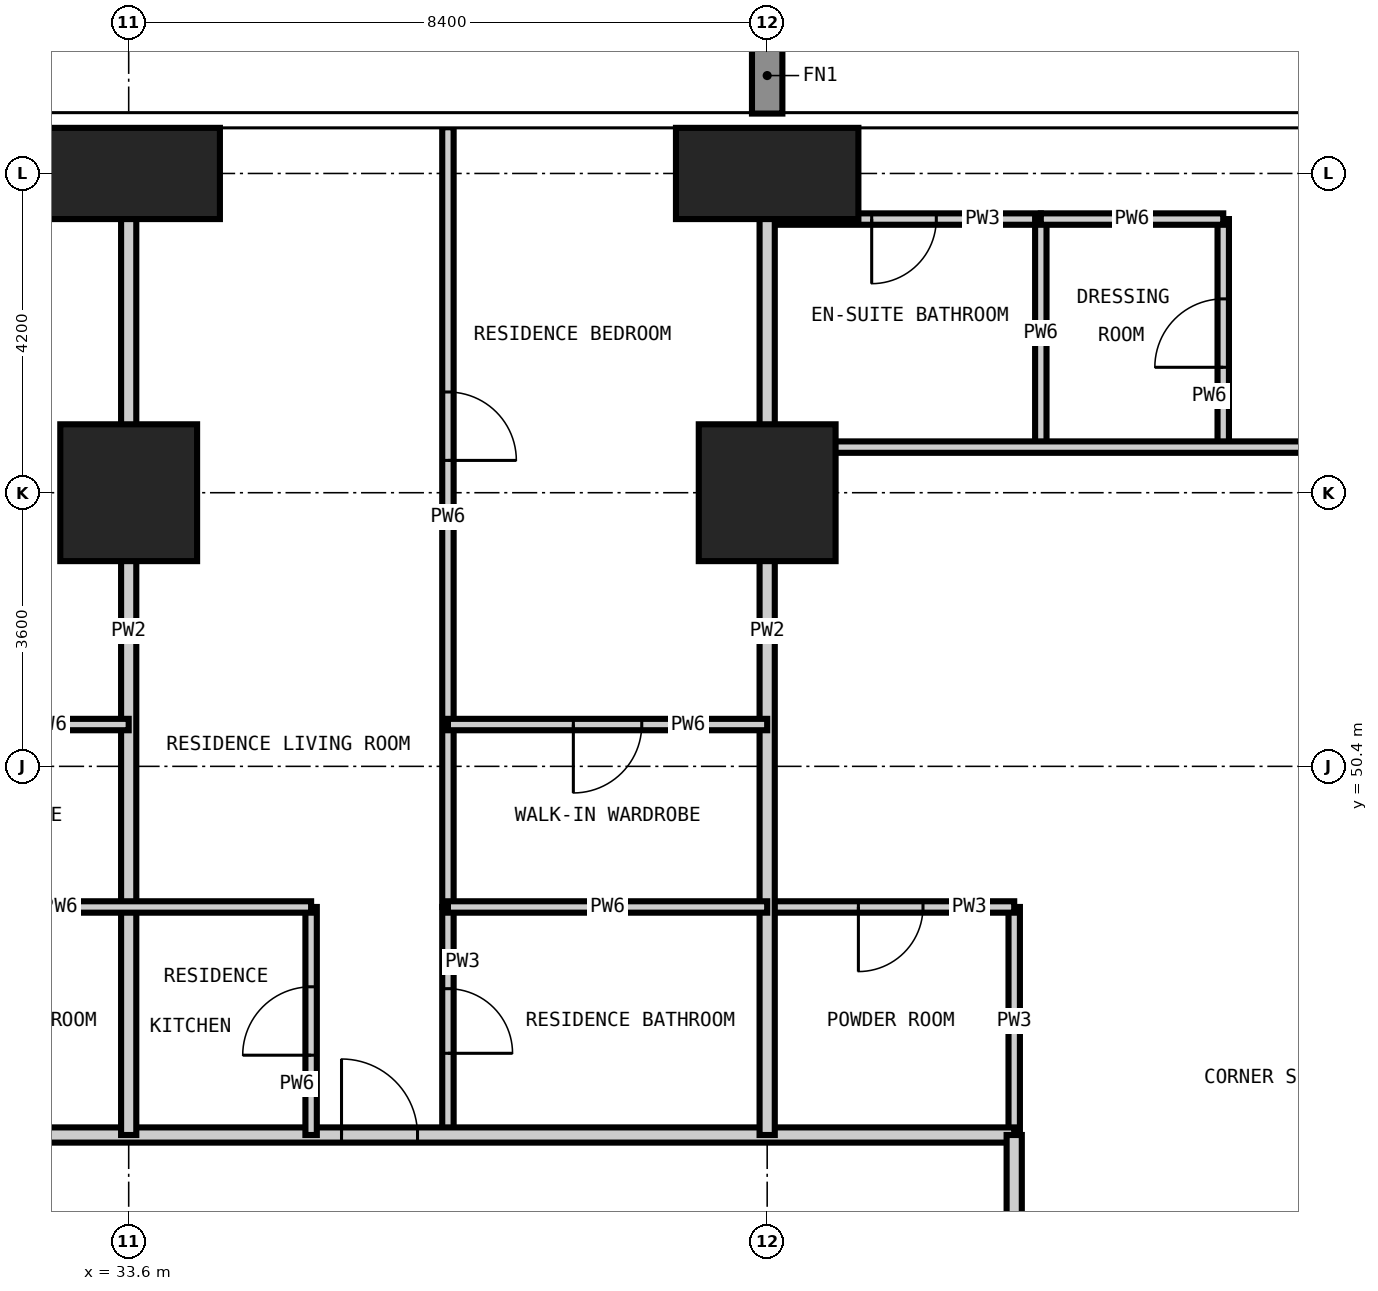
"""IFC4 building model, lengths in metres.
Left out: names, types, materials, properties, quantities, classifications, styles, units other than length and angle.
Written with IfcOpenShell. Run it as: python <this file> out.ifc"""

import sys

from ifc_helpers import new_model, si_unit, direction, frame, frame_2d, origin, origin_2d, place, context, subcontext, project, spatial, rectangle, extrude, element, fill, save


model = new_model("IFC4")
c1 = context("Model", 3, precision=1e-05, world=origin(), true_north=direction((0.0, 1.0)))
c2 = subcontext(c1, "Body", "Model", "MODEL_VIEW")
j1 = project(units=[si_unit("LENGTHUNIT", "METRE"), si_unit("PLANEANGLEUNIT", "RADIAN")], contexts=[c1])
p1 = place(None, origin())
s1 = spatial("IfcSite", under=j1, at=p1, CompositionType="ELEMENT")
p2 = place(p1, origin())
s2 = spatial("IfcBuilding", under=s1, at=p2, CompositionType="ELEMENT")
p3 = place(p2, frame((0.0, 0.0, 45.0)))
s3 = spatial("IfcBuildingStorey", under=s2, at=p3, CompositionType="ELEMENT", Elevation=45.0)
p4 = place(p3, frame((33.6, 54.0, -0.35), z_axis=(0.0, 0.0, 1.0), x_axis=(1.0, 0.0, 0.0)))
e1 = element("IfcColumn", 1, at=p4, inside=s3, PredefinedType="COLUMN", context=c2, shape_type="SweptSolid", body=[
    extrude(rectangle(XDim=1.8, YDim=1.8, at=origin_2d()), origin(), (0.0, 0.0, 1.0), 3.6),
])
p5 = place(p3, frame((33.6, 58.2, -0.35), z_axis=(0.0, 0.0, 1.0), x_axis=(1.0, 0.0, 0.0)))
e2 = element("IfcColumn", 2, at=p5, inside=s3, PredefinedType="COLUMN", context=c2, shape_type="SweptSolid", body=[
    extrude(rectangle(XDim=2.4, YDim=1.2, at=origin_2d()), origin(), (0.0, 0.0, 1.0), 3.6),
])
p6 = place(p3, frame((42.0, 54.0, -0.35), z_axis=(0.0, 0.0, 1.0), x_axis=(1.0, 0.0, 0.0)))
e3 = element("IfcColumn", 3, at=p6, inside=s3, PredefinedType="COLUMN", context=c2, shape_type="SweptSolid", body=[
    extrude(rectangle(XDim=1.8, YDim=1.8, at=origin_2d()), origin(), (0.0, 0.0, 1.0), 3.6),
])
p7 = place(p3, frame((42.0, 58.2, -0.35), z_axis=(0.0, 0.0, 1.0), x_axis=(1.0, 0.0, 0.0)))
e4 = element("IfcColumn", 4, at=p7, inside=s3, PredefinedType="COLUMN", context=c2, shape_type="SweptSolid", body=[
    extrude(rectangle(XDim=2.4, YDim=1.2, at=origin_2d()), origin(), (0.0, 0.0, 1.0), 3.6),
])
p8 = place(p3, frame((37.8, 45.55, 0.0), z_axis=(0.0, 0.0, 1.0), x_axis=(0.0, 1.0, 0.0)))
e5 = element("IfcWall", 5, at=p8, inside=s3, PredefinedType="PARTITIONING", context=c2, shape_type="SweptSolid", body=[
    extrude(rectangle(XDim=3.0, YDim=0.15, at=frame_2d((1.5, 0.0))), origin(), (0.0, 0.0, 1.0), 3.25),
])
p9 = place(p8, frame((1.075, 0.0, 0.0)))
e6 = element("IfcOpeningElement", 6, at=p9, cuts=e5, PredefinedType="OPENING", context=c2, shape_type="SweptSolid", body=[
    extrude(rectangle(XDim=0.85, YDim=2.1, at=frame_2d((0.425, 1.05))), frame((0.0, 0.085, 0.0), z_axis=(0.0, -1.0, 0.0), x_axis=(1.0, 0.0, 0.0)), (0.0, 0.0, 1.0), 0.17),
])
p10 = place(p3, frame((45.25, 45.55, 0.0), z_axis=(0.0, 0.0, 1.0), x_axis=(0.0, 1.0, 0.0)))
e7 = element("IfcWall", 7, at=p10, inside=s3, PredefinedType="PARTITIONING", context=c2, shape_type="SweptSolid", body=[
    extrude(rectangle(XDim=3.0, YDim=0.15, at=frame_2d((1.5, 0.0))), origin(), (0.0, 0.0, 1.0), 3.25),
])
p11 = place(p3, frame((42.0, 48.55, 0.0), z_axis=(0.0, 0.0, 1.0), x_axis=(1.0, 0.0, 0.0)))
e8 = element("IfcWall", 8, at=p11, inside=s3, PredefinedType="PARTITIONING", context=c2, shape_type="SweptSolid", body=[
    extrude(rectangle(XDim=3.25, YDim=0.15, at=frame_2d((1.625, 0.0))), origin(), (0.0, 0.0, 1.0), 3.25),
])
p12 = place(p11, frame((1.2, 0.0, 0.0)))
e9 = element("IfcOpeningElement", 9, at=p12, cuts=e8, PredefinedType="OPENING", context=c2, shape_type="SweptSolid", body=[
    extrude(rectangle(XDim=0.85, YDim=2.1, at=frame_2d((0.425, 1.05))), frame((0.0, 0.085, 0.0), z_axis=(0.0, -1.0, 0.0), x_axis=(1.0, 0.0, 0.0)), (0.0, 0.0, 1.0), 0.17),
])
p13 = place(p3, frame((42.0, 57.6, 0.0), z_axis=(0.0, 0.0, 1.0), x_axis=(1.0, 0.0, 0.0)))
e10 = element("IfcWall", 10, at=p13, inside=s3, PredefinedType="PARTITIONING", context=c2, shape_type="SweptSolid", body=[
    extrude(rectangle(XDim=3.6, YDim=0.15, at=frame_2d((1.8, 0.0))), origin(), (0.0, 0.0, 1.0), 3.25),
])
p14 = place(p13, frame((1.375, 0.0, 0.0)))
e11 = element("IfcOpeningElement", 11, at=p14, cuts=e10, PredefinedType="OPENING", context=c2, shape_type="SweptSolid", body=[
    extrude(rectangle(XDim=0.85, YDim=2.1, at=frame_2d((0.425, 1.05))), frame((0.0, 0.085, 0.0), z_axis=(0.0, -1.0, 0.0), x_axis=(1.0, 0.0, 0.0)), (0.0, 0.0, 1.0), 0.17),
])
p15 = place(p3, frame((12.95, 45.55, 0.0), z_axis=(0.0, 0.0, 1.0), x_axis=(1.0, 0.0, 0.0)))
e12 = element("IfcWall", 12, at=p15, inside=s3, PredefinedType="PARTITIONING", context=c2, shape_type="SweptSolid", body=[
    extrude(rectangle(XDim=32.3, YDim=0.2, at=frame_2d((16.15, 0.0))), origin(), (0.0, 0.0, 1.0), 3.25),
])
p16 = place(p15, frame((6.65, 0.0, 0.0)))
e13 = element("IfcOpeningElement", 13, at=p16, cuts=e12, PredefinedType="OPENING", context=c2, shape_type="SweptSolid", body=[
    extrude(rectangle(XDim=1.0, YDim=2.2, at=frame_2d((0.5, 1.1))), frame((0.0, 0.11, 0.0), z_axis=(0.0, -1.0, 0.0), x_axis=(1.0, 0.0, 0.0)), (0.0, 0.0, 1.0), 0.22),
])
p17 = place(p15, frame((15.05, 0.0, 0.0)))
e14 = element("IfcOpeningElement", 14, at=p17, cuts=e12, PredefinedType="OPENING", context=c2, shape_type="SweptSolid", body=[
    extrude(rectangle(XDim=1.0, YDim=2.2, at=frame_2d((0.5, 1.1))), frame((0.0, 0.11, 0.0), z_axis=(0.0, -1.0, 0.0), x_axis=(1.0, 0.0, 0.0)), (0.0, 0.0, 1.0), 0.22),
])
p18 = place(p15, frame((23.45, 0.0, 0.0)))
e15 = element("IfcOpeningElement", 15, at=p18, cuts=e12, PredefinedType="OPENING", context=c2, shape_type="SweptSolid", body=[
    extrude(rectangle(XDim=1.0, YDim=2.2, at=frame_2d((0.5, 1.1))), frame((0.0, 0.11, 0.0), z_axis=(0.0, -1.0, 0.0), x_axis=(1.0, 0.0, 0.0)), (0.0, 0.0, 1.0), 0.22),
])
p19 = place(p3, frame((45.25, 45.55, 0.0), z_axis=(0.0, 0.0, 1.0), x_axis=(0.0, -1.0, 0.0)))
e16 = element("IfcWall", 16, at=p19, inside=s3, PredefinedType="PARTITIONING", context=c2, shape_type="SweptSolid", body=[
    extrude(rectangle(XDim=32.6, YDim=0.2, at=frame_2d((16.3, 0.0))), origin(), (0.0, 0.0, 1.0), 3.25),
])
p20 = place(p19, frame((24.8, 0.0, 0.0)))
e17 = element("IfcOpeningElement", 17, at=p20, cuts=e16, PredefinedType="OPENING", context=c2, shape_type="SweptSolid", body=[
    extrude(rectangle(XDim=1.0, YDim=2.2, at=frame_2d((0.5, 1.1))), frame((0.0, 0.11, 0.0), z_axis=(0.0, -1.0, 0.0), x_axis=(1.0, 0.0, 0.0)), (0.0, 0.0, 1.0), 0.22),
])
p21 = place(p19, frame((19.85, 0.0, 0.0)))
e18 = element("IfcOpeningElement", 18, at=p21, cuts=e16, PredefinedType="OPENING", context=c2, shape_type="SweptSolid", body=[
    extrude(rectangle(XDim=1.0, YDim=2.2, at=frame_2d((0.5, 1.1))), frame((0.0, 0.11, 0.0), z_axis=(0.0, -1.0, 0.0), x_axis=(1.0, 0.0, 0.0)), (0.0, 0.0, 1.0), 0.22),
])
p22 = place(p19, frame((11.45, 0.0, 0.0)))
e19 = element("IfcOpeningElement", 19, at=p22, cuts=e16, PredefinedType="OPENING", context=c2, shape_type="SweptSolid", body=[
    extrude(rectangle(XDim=1.0, YDim=2.2, at=frame_2d((0.5, 1.1))), frame((0.0, 0.11, 0.0), z_axis=(0.0, -1.0, 0.0), x_axis=(1.0, 0.0, 0.0)), (0.0, 0.0, 1.0), 0.22),
])
p23 = place(p19, frame((6.5, 0.0, 0.0)))
e20 = element("IfcOpeningElement", 20, at=p23, cuts=e16, PredefinedType="OPENING", context=c2, shape_type="SweptSolid", body=[
    extrude(rectangle(XDim=1.0, YDim=2.2, at=frame_2d((0.5, 1.1))), frame((0.0, 0.11, 0.0), z_axis=(0.0, -1.0, 0.0), x_axis=(1.0, 0.0, 0.0)), (0.0, 0.0, 1.0), 0.22),
])
p24 = place(p19, frame((30.175, 0.0, 0.0)))
e21 = element("IfcOpeningElement", 21, at=p24, cuts=e16, PredefinedType="OPENING", context=c2, shape_type="SweptSolid", body=[
    extrude(rectangle(XDim=1.0, YDim=2.2, at=frame_2d((0.5, 1.1))), frame((0.0, 0.11, 0.0), z_axis=(0.0, -1.0, 0.0), x_axis=(1.0, 0.0, 0.0)), (0.0, 0.0, 1.0), 0.22),
])
p25 = place(p19, frame((1.275, 0.0, 0.0)))
e22 = element("IfcOpeningElement", 22, at=p25, cuts=e16, PredefinedType="OPENING", context=c2, shape_type="SweptSolid", body=[
    extrude(rectangle(XDim=1.0, YDim=2.2, at=frame_2d((0.5, 1.1))), frame((0.0, 0.11, 0.0), z_axis=(0.0, -1.0, 0.0), x_axis=(1.0, 0.0, 0.0)), (0.0, 0.0, 1.0), 0.22),
])
for number, where, z_axis, x_axis in (
    (23, (33.6, 45.55, 0.0), (0.0, 0.0, 1.0), (0.0, 1.0, 0.0)),
    (24, (42.0, 45.55, 0.0), (0.0, 0.0, 1.0), (0.0, 1.0, 0.0)),
):
    element("IfcWall", number, at=place(p3, frame(where, z_axis=z_axis, x_axis=x_axis)), inside=s3, PredefinedType="PARTITIONING", context=c2, shape_type="SweptSolid", body=[
        extrude(rectangle(XDim=13.258, YDim=0.2, at=frame_2d((6.629, 0.0))), origin(), (0.0, 0.0, 1.0), 3.25),
    ])
p26 = place(p3, frame((36.0, 45.55, 0.0), z_axis=(0.0, 0.0, 1.0), x_axis=(0.0, 1.0, 0.0)))
e25 = element("IfcWall", 25, at=p26, inside=s3, PredefinedType="PARTITIONING", context=c2, shape_type="SweptSolid", body=[
    extrude(rectangle(XDim=3.0, YDim=0.15, at=frame_2d((1.5, 0.0))), origin(), (0.0, 0.0, 1.0), 3.25),
])
p27 = place(p26, frame((1.05, 0.0, 0.0)))
e26 = element("IfcOpeningElement", 26, at=p27, cuts=e25, PredefinedType="OPENING", context=c2, shape_type="SweptSolid", body=[
    extrude(rectangle(XDim=0.9, YDim=2.1, at=frame_2d((0.45, 1.05))), frame((0.0, 0.085, 0.0), z_axis=(0.0, -1.0, 0.0), x_axis=(1.0, 0.0, 0.0)), (0.0, 0.0, 1.0), 0.17),
])
p28 = place(p3, frame((37.8, 48.55, 0.0), z_axis=(0.0, 0.0, 1.0), x_axis=(0.0, 1.0, 0.0)))
e27 = element("IfcWall", 27, at=p28, inside=s3, PredefinedType="PARTITIONING", context=c2, shape_type="SweptSolid", body=[
    extrude(rectangle(XDim=10.258, YDim=0.15, at=frame_2d((5.129, 0.0))), origin(), (0.0, 0.0, 1.0), 3.25),
])
p29 = place(p28, frame((5.875, 0.0, 0.0)))
e28 = element("IfcOpeningElement", 28, at=p29, cuts=e27, PredefinedType="OPENING", context=c2, shape_type="SweptSolid", body=[
    extrude(rectangle(XDim=0.9, YDim=2.1, at=frame_2d((0.45, 1.05))), frame((0.0, 0.085, 0.0), z_axis=(0.0, -1.0, 0.0), x_axis=(1.0, 0.0, 0.0)), (0.0, 0.0, 1.0), 0.17),
])
p30 = place(p3, frame((45.6, 54.6, 0.0), z_axis=(0.0, 0.0, 1.0), x_axis=(0.0, 1.0, 0.0)))
e29 = element("IfcWall", 29, at=p30, inside=s3, PredefinedType="PARTITIONING", context=c2, shape_type="SweptSolid", body=[
    extrude(rectangle(XDim=3.0, YDim=0.15, at=frame_2d((1.5, 0.0))), origin(), (0.0, 0.0, 1.0), 3.25),
])
p31 = place(p3, frame((48.0, 54.6, 0.0), z_axis=(0.0, 0.0, 1.0), x_axis=(0.0, 1.0, 0.0)))
e30 = element("IfcWall", 30, at=p31, inside=s3, PredefinedType="PARTITIONING", context=c2, shape_type="SweptSolid", body=[
    extrude(rectangle(XDim=3.0, YDim=0.15, at=frame_2d((1.5, 0.0))), origin(), (0.0, 0.0, 1.0), 3.25),
])
p32 = place(p31, frame((1.05, 0.0, 0.0)))
e31 = element("IfcOpeningElement", 31, at=p32, cuts=e30, PredefinedType="OPENING", context=c2, shape_type="SweptSolid", body=[
    extrude(rectangle(XDim=0.9, YDim=2.1, at=frame_2d((0.45, 1.05))), frame((0.0, 0.085, 0.0), z_axis=(0.0, -1.0, 0.0), x_axis=(1.0, 0.0, 0.0)), (0.0, 0.0, 1.0), 0.17),
])
p33 = place(p3, frame((29.4, 48.55, 0.0), z_axis=(0.0, 0.0, 1.0), x_axis=(1.0, 0.0, 0.0)))
e32 = element("IfcWall", 32, at=p33, inside=s3, PredefinedType="PARTITIONING", context=c2, shape_type="SweptSolid", body=[
    extrude(rectangle(XDim=6.6, YDim=0.15, at=frame_2d((3.3, 0.0))), origin(), (0.0, 0.0, 1.0), 3.25),
])
p34 = place(p3, frame((37.8, 48.55, 0.0), z_axis=(0.0, 0.0, 1.0), x_axis=(1.0, 0.0, 0.0)))
e33 = element("IfcWall", 33, at=p34, inside=s3, PredefinedType="PARTITIONING", context=c2, shape_type="SweptSolid", body=[
    extrude(rectangle(XDim=4.2, YDim=0.15, at=frame_2d((2.1, 0.0))), origin(), (0.0, 0.0, 1.0), 3.25),
])
p35 = place(p3, frame((29.4, 50.95, 0.0), z_axis=(0.0, 0.0, 1.0), x_axis=(1.0, 0.0, 0.0)))
e34 = element("IfcWall", 34, at=p35, inside=s3, PredefinedType="PARTITIONING", context=c2, shape_type="SweptSolid", body=[
    extrude(rectangle(XDim=4.2, YDim=0.15, at=frame_2d((2.1, 0.0))), origin(), (0.0, 0.0, 1.0), 3.25),
])
p36 = place(p35, frame((1.65, 0.0, 0.0)))
e35 = element("IfcOpeningElement", 35, at=p36, cuts=e34, PredefinedType="OPENING", context=c2, shape_type="SweptSolid", body=[
    extrude(rectangle(XDim=0.9, YDim=2.1, at=frame_2d((0.45, 1.05))), frame((0.0, 0.085, 0.0), z_axis=(0.0, -1.0, 0.0), x_axis=(1.0, 0.0, 0.0)), (0.0, 0.0, 1.0), 0.17),
])
p37 = place(p3, frame((37.8, 50.95, 0.0), z_axis=(0.0, 0.0, 1.0), x_axis=(1.0, 0.0, 0.0)))
e36 = element("IfcWall", 36, at=p37, inside=s3, PredefinedType="PARTITIONING", context=c2, shape_type="SweptSolid", body=[
    extrude(rectangle(XDim=4.2, YDim=0.15, at=frame_2d((2.1, 0.0))), origin(), (0.0, 0.0, 1.0), 3.25),
])
p38 = place(p37, frame((1.65, 0.0, 0.0)))
e37 = element("IfcOpeningElement", 37, at=p38, cuts=e36, PredefinedType="OPENING", context=c2, shape_type="SweptSolid", body=[
    extrude(rectangle(XDim=0.9, YDim=2.1, at=frame_2d((0.45, 1.05))), frame((0.0, 0.085, 0.0), z_axis=(0.0, -1.0, 0.0), x_axis=(1.0, 0.0, 0.0)), (0.0, 0.0, 1.0), 0.17),
])
p39 = place(p3, frame((42.0, 54.6, 0.0), z_axis=(0.0, 0.0, 1.0), x_axis=(1.0, 0.0, 0.0)))
e38 = element("IfcWall", 38, at=p39, inside=s3, PredefinedType="PARTITIONING", context=c2, shape_type="SweptSolid", body=[
    extrude(rectangle(XDim=16.808, YDim=0.15, at=frame_2d((8.404, 0.0))), origin(), (0.0, 0.0, 1.0), 3.25),
])
p40 = place(p39, frame((10.95, 0.0, 0.0)))
e39 = element("IfcOpeningElement", 39, at=p40, cuts=e38, PredefinedType="OPENING", context=c2, shape_type="SweptSolid", body=[
    extrude(rectangle(XDim=0.9, YDim=2.1, at=frame_2d((0.45, 1.05))), frame((0.0, 0.085, 0.0), z_axis=(0.0, -1.0, 0.0), x_axis=(1.0, 0.0, 0.0)), (0.0, 0.0, 1.0), 0.17),
])
p41 = place(p3, frame((45.6, 57.6, 0.0), z_axis=(0.0, 0.0, 1.0), x_axis=(1.0, 0.0, 0.0)))
e40 = element("IfcWall", 40, at=p41, inside=s3, PredefinedType="PARTITIONING", context=c2, shape_type="SweptSolid", body=[
    extrude(rectangle(XDim=2.4, YDim=0.15, at=frame_2d((1.2, 0.0))), origin(), (0.0, 0.0, 1.0), 3.25),
])
p42 = place(p18, origin())
e41 = element("IfcDoor", 41, at=p42, inside=s3, OperationType="SINGLE_SWING_LEFT", PredefinedType="DOOR", context=c2, shape_type="SweptSolid", body=[
    extrude(rectangle(XDim=1.0, YDim=2.2, at=frame_2d((0.5, 1.1))), frame((0.0, 0.025, 0.0), z_axis=(0.0, -1.0, 0.0), x_axis=(1.0, 0.0, 0.0)), (0.0, 0.0, 1.0), 0.05),
])
fill(e15, e41)
p43 = place(p27, origin())
e42 = element("IfcDoor", 42, at=p43, inside=s3, OperationType="SINGLE_SWING_LEFT", PredefinedType="DOOR", context=c2, shape_type="SweptSolid", body=[
    extrude(rectangle(XDim=0.9, YDim=2.1, at=frame_2d((0.45, 1.05))), frame((0.0, 0.025, 0.0), z_axis=(0.0, -1.0, 0.0), x_axis=(1.0, 0.0, 0.0)), (0.0, 0.0, 1.0), 0.05),
])
fill(e26, e42)
p44 = place(p9, frame((0.85, 0.0, 0.0), z_axis=(0.0, 0.0, 1.0), x_axis=(-1.0, 0.0, 0.0)))
e43 = element("IfcDoor", 43, at=p44, inside=s3, OperationType="SINGLE_SWING_RIGHT", PredefinedType="DOOR", context=c2, shape_type="SweptSolid", body=[
    extrude(rectangle(XDim=0.85, YDim=2.1, at=frame_2d((0.425, 1.05))), frame((0.0, 0.025, 0.0), z_axis=(0.0, -1.0, 0.0), x_axis=(1.0, 0.0, 0.0)), (0.0, 0.0, 1.0), 0.05),
])
fill(e6, e43)
p45 = place(p38, frame((0.9, 0.0, 0.0), z_axis=(0.0, 0.0, 1.0), x_axis=(-1.0, 0.0, 0.0)))
e44 = element("IfcDoor", 44, at=p45, inside=s3, OperationType="SINGLE_SWING_RIGHT", PredefinedType="DOOR", context=c2, shape_type="SweptSolid", body=[
    extrude(rectangle(XDim=0.9, YDim=2.1, at=frame_2d((0.45, 1.05))), frame((0.0, 0.025, 0.0), z_axis=(0.0, -1.0, 0.0), x_axis=(1.0, 0.0, 0.0)), (0.0, 0.0, 1.0), 0.05),
])
fill(e37, e44)
p46 = place(p29, frame((0.9, 0.0, 0.0), z_axis=(0.0, 0.0, 1.0), x_axis=(-1.0, 0.0, 0.0)))
e45 = element("IfcDoor", 45, at=p46, inside=s3, OperationType="SINGLE_SWING_RIGHT", PredefinedType="DOOR", context=c2, shape_type="SweptSolid", body=[
    extrude(rectangle(XDim=0.9, YDim=2.1, at=frame_2d((0.45, 1.05))), frame((0.0, 0.025, 0.0), z_axis=(0.0, -1.0, 0.0), x_axis=(1.0, 0.0, 0.0)), (0.0, 0.0, 1.0), 0.05),
])
fill(e28, e45)
p47 = place(p12, frame((0.85, 0.0, 0.0), z_axis=(0.0, 0.0, 1.0), x_axis=(-1.0, 0.0, 0.0)))
e46 = element("IfcDoor", 46, at=p47, inside=s3, OperationType="SINGLE_SWING_RIGHT", PredefinedType="DOOR", context=c2, shape_type="SweptSolid", body=[
    extrude(rectangle(XDim=0.85, YDim=2.1, at=frame_2d((0.425, 1.05))), frame((0.0, 0.025, 0.0), z_axis=(0.0, -1.0, 0.0), x_axis=(1.0, 0.0, 0.0)), (0.0, 0.0, 1.0), 0.05),
])
fill(e9, e46)
p48 = place(p14, frame((0.85, 0.0, 0.0), z_axis=(0.0, 0.0, 1.0), x_axis=(-1.0, 0.0, 0.0)))
e47 = element("IfcDoor", 47, at=p48, inside=s3, OperationType="SINGLE_SWING_RIGHT", PredefinedType="DOOR", context=c2, shape_type="SweptSolid", body=[
    extrude(rectangle(XDim=0.85, YDim=2.1, at=frame_2d((0.425, 1.05))), frame((0.0, 0.025, 0.0), z_axis=(0.0, -1.0, 0.0), x_axis=(1.0, 0.0, 0.0)), (0.0, 0.0, 1.0), 0.05),
])
fill(e11, e47)
p49 = place(p32, origin())
e48 = element("IfcDoor", 48, at=p49, inside=s3, OperationType="SINGLE_SWING_LEFT", PredefinedType="DOOR", context=c2, shape_type="SweptSolid", body=[
    extrude(rectangle(XDim=0.9, YDim=2.1, at=frame_2d((0.45, 1.05))), frame((0.0, 0.025, 0.0), z_axis=(0.0, -1.0, 0.0), x_axis=(1.0, 0.0, 0.0)), (0.0, 0.0, 1.0), 0.05),
])
fill(e31, e48)
save(model, sys.argv[1])
